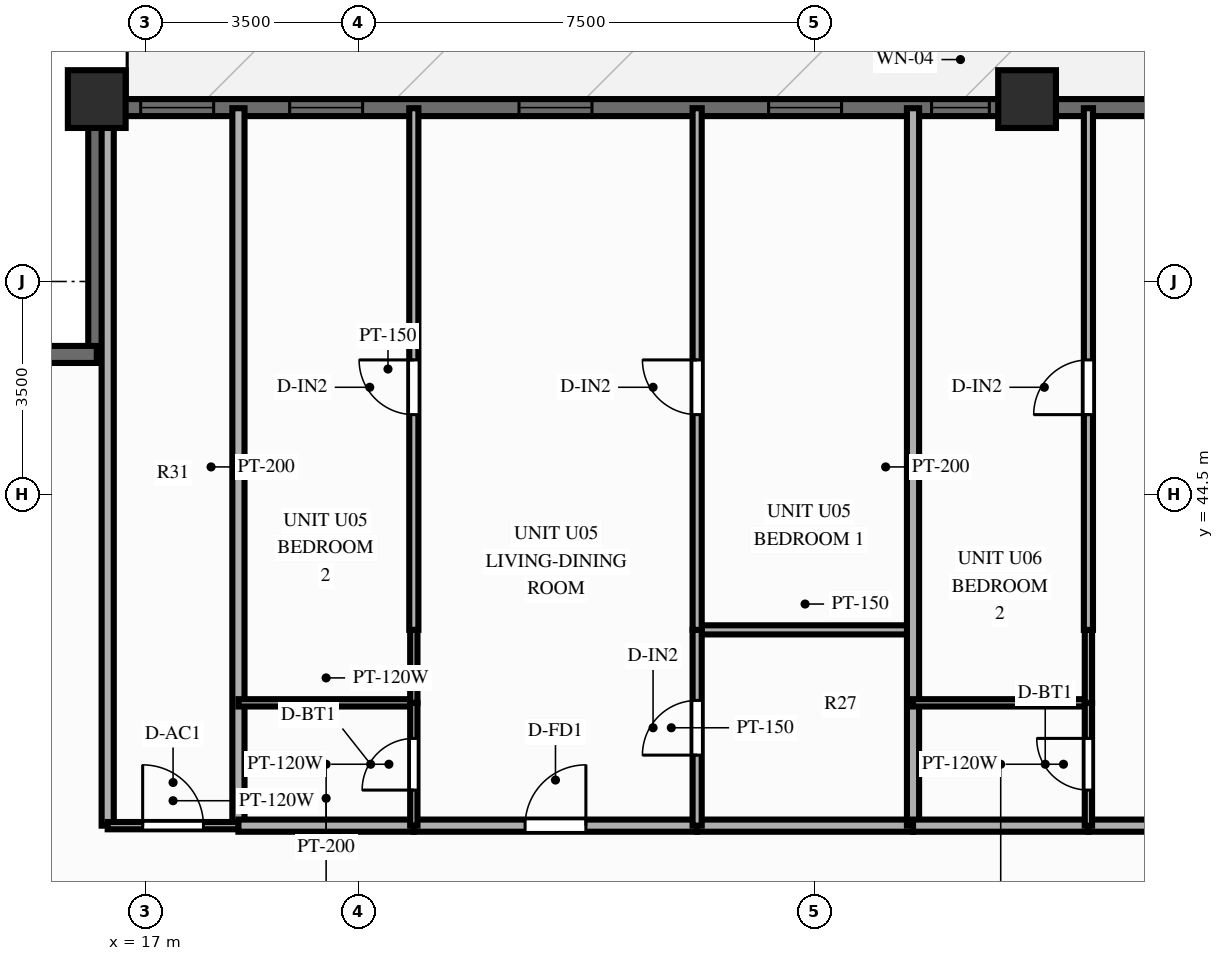
"""IFC4 building model, lengths in metres.
Left out: names, types, materials, properties, quantities, classifications, styles, units other than length and angle.
Written with IfcOpenShell. Run it as: python <this file> out.ifc"""

import sys

from ifc_helpers import new_model, si_unit, direction, frame, frame_2d, origin, origin_2d, place, context, subcontext, project, spatial, rectangle, extrude, source, transform, mapped, element, fill, save


model = new_model("IFC4")
c1 = context("Model", 3, precision=1e-05, world=origin(), true_north=direction((0.0, 1.0)))
c2 = subcontext(c1, "Body", "Model", "MODEL_VIEW")
j1 = project(units=[si_unit("LENGTHUNIT", "METRE"), si_unit("PLANEANGLEUNIT", "RADIAN")], contexts=[c1])
p1 = place(None, origin())
s1 = spatial("IfcSite", under=j1, at=p1, CompositionType="ELEMENT")
p2 = place(p1, origin())
s2 = spatial("IfcBuilding", under=s1, at=p2, CompositionType="ELEMENT")
p3 = place(p2, frame((0.0, 0.0, 86.85)))
s3 = spatial("IfcBuildingStorey", under=s2, at=p3, CompositionType="ELEMENT", Elevation=86.85)
m1 = source(origin(), c2, "Body", "SweptSolid", [
    extrude(rectangle(XDim=0.95, YDim=0.95, at=origin_2d()), origin(), (0.0, 0.0, 1.0), 3.0),
])
for number, where, z_axis, x_axis in (
    (1, (31.5, 51.0, 0.0), (0.0, 0.0, 1.0), (1.0, 0.0, 0.0)),
    (2, (16.2, 51.0, 0.0), (0.0, 0.0, 1.0), (1.0, 0.0, 0.0)),
):
    element("IfcColumn", number, at=place(p3, frame(where, z_axis=z_axis, x_axis=x_axis)), inside=s3, PredefinedType="COLUMN", context=c2, shape_type="MappedRepresentation", body=[
        mapped(m1, transform((0.0, 0.0, 0.0), scale=1.0)),
    ])
p4 = place(p3, frame((16.2, 50.86, 0.0), z_axis=(0.0, 0.0, 1.0), x_axis=(1.0, 0.0, 0.0)))
e3 = element("IfcWall", 3, at=p4, inside=s3, PredefinedType="SOLIDWALL", context=c2, shape_type="SweptSolid", body=[
    extrude(rectangle(XDim=43.6, YDim=0.28, at=frame_2d((21.8, 0.0))), origin(), (0.0, 0.0, 1.0), 2.28),
])
p5 = place(p4, frame((0.722, 0.0, 0.25)))
e4 = element("IfcOpeningElement", 4, at=p5, cuts=e3, PredefinedType="OPENING", context=c2, shape_type="SweptSolid", body=[
    extrude(rectangle(XDim=1.2, YDim=1.5, at=frame_2d((0.6, 0.75))), frame((0.0, 0.152, 0.0), z_axis=(0.0, -1.0, 0.0), x_axis=(1.0, 0.0, 0.0)), (0.0, 0.0, 1.0), 0.304),
])
p6 = place(p4, frame((3.172, 0.0, 0.25)))
e5 = element("IfcOpeningElement", 5, at=p6, cuts=e3, PredefinedType="OPENING", context=c2, shape_type="SweptSolid", body=[
    extrude(rectangle(XDim=1.2, YDim=1.5, at=frame_2d((0.6, 0.75))), frame((0.0, 0.152, 0.0), z_axis=(0.0, -1.0, 0.0), x_axis=(1.0, 0.0, 0.0)), (0.0, 0.0, 1.0), 0.304),
])
p7 = place(p4, frame((6.944, 0.0, 0.25)))
e6 = element("IfcOpeningElement", 6, at=p7, cuts=e3, PredefinedType="OPENING", context=c2, shape_type="SweptSolid", body=[
    extrude(rectangle(XDim=1.2, YDim=1.5, at=frame_2d((0.6, 0.75))), frame((0.0, 0.152, 0.0), z_axis=(0.0, -1.0, 0.0), x_axis=(1.0, 0.0, 0.0)), (0.0, 0.0, 1.0), 0.304),
])
p8 = place(p4, frame((11.049, 0.0, 0.25)))
e7 = element("IfcOpeningElement", 7, at=p8, cuts=e3, PredefinedType="OPENING", context=c2, shape_type="SweptSolid", body=[
    extrude(rectangle(XDim=1.2, YDim=1.5, at=frame_2d((0.6, 0.75))), frame((0.0, 0.152, 0.0), z_axis=(0.0, -1.0, 0.0), x_axis=(1.0, 0.0, 0.0)), (0.0, 0.0, 1.0), 0.304),
])
p9 = place(p4, frame((13.73, 0.0, 0.25)))
e8 = element("IfcOpeningElement", 8, at=p9, cuts=e3, PredefinedType="OPENING", context=c2, shape_type="SweptSolid", body=[
    extrude(rectangle(XDim=0.95, YDim=1.5, at=frame_2d((0.475, 0.75))), frame((0.0, 0.152, 0.0), z_axis=(0.0, -1.0, 0.0), x_axis=(1.0, 0.0, 0.0)), (0.0, 0.0, 1.0), 0.304),
])
p10 = place(p4, frame((18.089, 0.0, 0.0)))
e9 = element("IfcOpeningElement", 9, at=p10, cuts=e3, PredefinedType="OPENING", context=c2, shape_type="SweptSolid", body=[
    extrude(rectangle(XDim=1.1, YDim=2.15, at=frame_2d((0.55, 1.075))), frame((0.0, 0.152, 0.0), z_axis=(0.0, -1.0, 0.0), x_axis=(1.0, 0.0, 0.0)), (0.0, 0.0, 1.0), 0.304),
])
p11 = place(p4, frame((22.144, 0.0, 0.25)))
e10 = element("IfcOpeningElement", 10, at=p11, cuts=e3, PredefinedType="OPENING", context=c2, shape_type="SweptSolid", body=[
    extrude(rectangle(XDim=1.2, YDim=1.5, at=frame_2d((0.6, 0.75))), frame((0.0, 0.152, 0.0), z_axis=(0.0, -1.0, 0.0), x_axis=(1.0, 0.0, 0.0)), (0.0, 0.0, 1.0), 0.304),
])
p12 = place(p4, frame((25.242, 0.0, 0.25)))
e11 = element("IfcOpeningElement", 11, at=p12, cuts=e3, PredefinedType="OPENING", context=c2, shape_type="SweptSolid", body=[
    extrude(rectangle(XDim=1.2, YDim=1.5, at=frame_2d((0.6, 0.75))), frame((0.0, 0.152, 0.0), z_axis=(0.0, -1.0, 0.0), x_axis=(1.0, 0.0, 0.0)), (0.0, 0.0, 1.0), 0.304),
])
p13 = place(p4, frame((29.021, 0.0, 0.25)))
e12 = element("IfcOpeningElement", 12, at=p13, cuts=e3, PredefinedType="OPENING", context=c2, shape_type="SweptSolid", body=[
    extrude(rectangle(XDim=0.95, YDim=1.5, at=frame_2d((0.475, 0.75))), frame((0.0, 0.152, 0.0), z_axis=(0.0, -1.0, 0.0), x_axis=(1.0, 0.0, 0.0)), (0.0, 0.0, 1.0), 0.304),
])
p14 = place(p4, frame((31.574, 0.0, 0.25)))
e13 = element("IfcOpeningElement", 13, at=p14, cuts=e3, PredefinedType="OPENING", context=c2, shape_type="SweptSolid", body=[
    extrude(rectangle(XDim=1.2, YDim=1.5, at=frame_2d((0.6, 0.75))), frame((0.0, 0.152, 0.0), z_axis=(0.0, -1.0, 0.0), x_axis=(1.0, 0.0, 0.0)), (0.0, 0.0, 1.0), 0.304),
])
p15 = place(p4, frame((34.692, 0.0, 0.25)))
e14 = element("IfcOpeningElement", 14, at=p15, cuts=e3, PredefinedType="OPENING", context=c2, shape_type="SweptSolid", body=[
    extrude(rectangle(XDim=1.2, YDim=1.5, at=frame_2d((0.6, 0.75))), frame((0.0, 0.152, 0.0), z_axis=(0.0, -1.0, 0.0), x_axis=(1.0, 0.0, 0.0)), (0.0, 0.0, 1.0), 0.304),
])
p16 = place(p4, frame((37.622, 0.0, 0.25)))
e15 = element("IfcOpeningElement", 15, at=p16, cuts=e3, PredefinedType="OPENING", context=c2, shape_type="SweptSolid", body=[
    extrude(rectangle(XDim=1.2, YDim=1.5, at=frame_2d((0.6, 0.75))), frame((0.0, 0.152, 0.0), z_axis=(0.0, -1.0, 0.0), x_axis=(1.0, 0.0, 0.0)), (0.0, 0.0, 1.0), 0.304),
])
p17 = place(p4, frame((40.957, 0.0, 0.25)))
e16 = element("IfcOpeningElement", 16, at=p17, cuts=e3, PredefinedType="OPENING", context=c2, shape_type="SweptSolid", body=[
    extrude(rectangle(XDim=1.2, YDim=1.5, at=frame_2d((0.6, 0.75))), frame((0.0, 0.152, 0.0), z_axis=(0.0, -1.0, 0.0), x_axis=(1.0, 0.0, 0.0)), (0.0, 0.0, 1.0), 0.304),
])
for number, where, z_axis, x_axis in (
    (17, (16.2, 46.8, 0.0), (0.0, 0.0, 1.0), (0.0, 1.0, 0.0)),
    (18, (12.08, 46.8, 0.0), (0.0, 0.0, 1.0), (1.0, 0.0, 0.0)),
):
    element("IfcWall", number, at=place(p3, frame(where, z_axis=z_axis, x_axis=x_axis)), inside=s3, PredefinedType="SOLIDWALL", context=c2, shape_type="SweptSolid", body=[
        extrude(rectangle(XDim=4.12, YDim=0.28, at=frame_2d((2.06, 0.0))), origin(), (0.0, 0.0, 1.0), 2.28),
    ])
for number, where, z_axis, x_axis in (
    (19, (16.38, 39.05, 0.0), (0.0, 0.0, 1.0), (0.0, 1.0, 0.0)),
    (20, (18.53, 39.05, 0.0), (0.0, 0.0, 1.0), (0.0, 1.0, 0.0)),
):
    element("IfcWall", number, at=place(p3, frame(where, z_axis=z_axis, x_axis=x_axis)), inside=s3, PredefinedType="PARTITIONING", context=c2, shape_type="SweptSolid", body=[
        extrude(rectangle(XDim=11.8, YDim=0.2, at=frame_2d((5.9, 0.0))), origin(), (0.0, 0.0, 1.0), 2.79),
    ])
p18 = place(p3, frame((16.38, 39.05, 0.0), z_axis=(0.0, 0.0, 1.0), x_axis=(1.0, 0.0, 0.0)))
e21 = element("IfcWall", 21, at=p18, inside=s3, PredefinedType="PARTITIONING", context=c2, shape_type="SweptSolid", body=[
    extrude(rectangle(XDim=2.15, YDim=0.12, at=frame_2d((1.075, 0.0))), origin(), (0.0, 0.0, 1.0), 2.79),
])
p19 = place(p18, frame((0.575, 0.0, 0.0)))
e22 = element("IfcOpeningElement", 22, at=p19, cuts=e21, PredefinedType="OPENING", context=c2, shape_type="SweptSolid", body=[
    extrude(rectangle(XDim=1.0, YDim=2.1, at=frame_2d((0.5, 1.05))), frame((0.0, 0.072, 0.0), z_axis=(0.0, -1.0, 0.0), x_axis=(1.0, 0.0, 0.0)), (0.0, 0.0, 1.0), 0.144),
])
p20 = place(p3, frame((18.53, 39.05, 0.0), z_axis=(0.0, 0.0, 1.0), x_axis=(1.0, 0.0, 0.0)))
e23 = element("IfcWall", 23, at=p20, inside=s3, PredefinedType="PARTITIONING", context=c2, shape_type="SweptSolid", body=[
    extrude(rectangle(XDim=2.885, YDim=0.2, at=frame_2d((1.442, 0.0))), origin(), (0.0, 0.0, 1.0), 2.79),
])
p21 = place(p3, frame((21.415, 39.05, 0.0), z_axis=(0.0, 0.0, 1.0), x_axis=(1.0, 0.0, 0.0)))
e24 = element("IfcWall", 24, at=p21, inside=s3, PredefinedType="PARTITIONING", context=c2, shape_type="SweptSolid", body=[
    extrude(rectangle(XDim=4.66, YDim=0.2, at=frame_2d((2.33, 0.0))), origin(), (0.0, 0.0, 1.0), 2.79),
])
p22 = place(p21, frame((1.83, 0.0, 0.0)))
e25 = element("IfcOpeningElement", 25, at=p22, cuts=e24, PredefinedType="OPENING", context=c2, shape_type="SweptSolid", body=[
    extrude(rectangle(XDim=1.0, YDim=2.15, at=frame_2d((0.5, 1.075))), frame((0.0, 0.112, 0.0), z_axis=(0.0, -1.0, 0.0), x_axis=(1.0, 0.0, 0.0)), (0.0, 0.0, 1.0), 0.224),
])
p23 = place(p3, frame((26.074, 39.05, 0.0), z_axis=(0.0, 0.0, 1.0), x_axis=(1.0, 0.0, 0.0)))
e26 = element("IfcWall", 26, at=p23, inside=s3, PredefinedType="PARTITIONING", context=c2, shape_type="SweptSolid", body=[
    extrude(rectangle(XDim=3.55, YDim=0.2, at=frame_2d((1.775, 0.0))), origin(), (0.0, 0.0, 1.0), 2.79),
])
p24 = place(p3, frame((18.53, 41.07, 0.0), z_axis=(0.0, 0.0, 1.0), x_axis=(1.0, 0.0, 0.0)))
e27 = element("IfcWall", 27, at=p24, inside=s3, PredefinedType="PARTITIONING", context=c2, shape_type="SweptSolid", body=[
    extrude(rectangle(XDim=2.885, YDim=0.12, at=frame_2d((1.442, 0.0))), origin(), (0.0, 0.0, 1.0), 2.79),
])
p25 = place(p3, frame((26.074, 42.27, 0.0), z_axis=(0.0, 0.0, 1.0), x_axis=(1.0, 0.0, 0.0)))
e28 = element("IfcWall", 28, at=p25, inside=s3, PredefinedType="PARTITIONING", context=c2, shape_type="SweptSolid", body=[
    extrude(rectangle(XDim=3.55, YDim=0.15, at=frame_2d((1.775, 0.0))), origin(), (0.0, 0.0, 1.0), 2.79),
])
p26 = place(p3, frame((21.415, 39.05, 0.0), z_axis=(0.0, 0.0, 1.0), x_axis=(0.0, 1.0, 0.0)))
e29 = element("IfcWall", 29, at=p26, inside=s3, PredefinedType="PARTITIONING", context=c2, shape_type="SweptSolid", body=[
    extrude(rectangle(XDim=2.02, YDim=0.12, at=frame_2d((1.01, 0.0))), origin(), (0.0, 0.0, 1.0), 2.79),
])
p27 = place(p26, frame((0.585, 0.0, 0.0)))
e30 = element("IfcOpeningElement", 30, at=p27, cuts=e29, PredefinedType="OPENING", context=c2, shape_type="SweptSolid", body=[
    extrude(rectangle(XDim=0.85, YDim=2.05, at=frame_2d((0.425, 1.025))), frame((0.0, 0.072, 0.0), z_axis=(0.0, -1.0, 0.0), x_axis=(1.0, 0.0, 0.0)), (0.0, 0.0, 1.0), 0.144),
])
p28 = place(p3, frame((21.415, 41.07, 0.0), z_axis=(0.0, 0.0, 1.0), x_axis=(0.0, 1.0, 0.0)))
e31 = element("IfcWall", 31, at=p28, inside=s3, PredefinedType="PARTITIONING", context=c2, shape_type="SweptSolid", body=[
    extrude(rectangle(XDim=1.2, YDim=0.12, at=frame_2d((0.6, 0.0))), origin(), (0.0, 0.0, 1.0), 2.79),
])
p29 = place(p3, frame((21.415, 42.27, 0.0), z_axis=(0.0, 0.0, 1.0), x_axis=(0.0, 1.0, 0.0)))
e32 = element("IfcWall", 32, at=p29, inside=s3, PredefinedType="PARTITIONING", context=c2, shape_type="SweptSolid", body=[
    extrude(rectangle(XDim=8.58, YDim=0.15, at=frame_2d((4.29, 0.0))), origin(), (0.0, 0.0, 1.0), 2.79),
])
p30 = place(p29, frame((3.54, 0.0, 0.0)))
e33 = element("IfcOpeningElement", 33, at=p30, cuts=e32, PredefinedType="OPENING", context=c2, shape_type="SweptSolid", body=[
    extrude(rectangle(XDim=0.9, YDim=2.1, at=frame_2d((0.45, 1.05))), frame((0.0, 0.087, 0.0), z_axis=(0.0, -1.0, 0.0), x_axis=(1.0, 0.0, 0.0)), (0.0, 0.0, 1.0), 0.174),
])
p31 = place(p3, frame((26.074, 39.05, 0.0), z_axis=(0.0, 0.0, 1.0), x_axis=(0.0, 1.0, 0.0)))
e34 = element("IfcWall", 34, at=p31, inside=s3, PredefinedType="PARTITIONING", context=c2, shape_type="SweptSolid", body=[
    extrude(rectangle(XDim=3.22, YDim=0.15, at=frame_2d((1.61, 0.0))), origin(), (0.0, 0.0, 1.0), 2.79),
])
p32 = place(p31, frame((1.16, 0.0, 0.0)))
e35 = element("IfcOpeningElement", 35, at=p32, cuts=e34, PredefinedType="OPENING", context=c2, shape_type="SweptSolid", body=[
    extrude(rectangle(XDim=0.9, YDim=2.1, at=frame_2d((0.45, 1.05))), frame((0.0, 0.087, 0.0), z_axis=(0.0, -1.0, 0.0), x_axis=(1.0, 0.0, 0.0)), (0.0, 0.0, 1.0), 0.174),
])
p33 = place(p3, frame((26.074, 42.27, 0.0), z_axis=(0.0, 0.0, 1.0), x_axis=(0.0, 1.0, 0.0)))
e36 = element("IfcWall", 36, at=p33, inside=s3, PredefinedType="PARTITIONING", context=c2, shape_type="SweptSolid", body=[
    extrude(rectangle(XDim=8.58, YDim=0.15, at=frame_2d((4.29, 0.0))), origin(), (0.0, 0.0, 1.0), 2.79),
])
p34 = place(p33, frame((3.54, 0.0, 0.0)))
e37 = element("IfcOpeningElement", 37, at=p34, cuts=e36, PredefinedType="OPENING", context=c2, shape_type="SweptSolid", body=[
    extrude(rectangle(XDim=0.9, YDim=2.1, at=frame_2d((0.45, 1.05))), frame((0.0, 0.087, 0.0), z_axis=(0.0, -1.0, 0.0), x_axis=(1.0, 0.0, 0.0)), (0.0, 0.0, 1.0), 0.174),
])
p35 = place(p3, frame((29.624, 39.05, 0.0), z_axis=(0.0, 0.0, 1.0), x_axis=(0.0, 1.0, 0.0)))
e38 = element("IfcWall", 38, at=p35, inside=s3, PredefinedType="PARTITIONING", context=c2, shape_type="SweptSolid", body=[
    extrude(rectangle(XDim=11.8, YDim=0.2, at=frame_2d((5.9, 0.0))), origin(), (0.0, 0.0, 1.0), 2.79),
])
p36 = place(p3, frame((29.624, 39.05, 0.0), z_axis=(0.0, 0.0, 1.0), x_axis=(1.0, 0.0, 0.0)))
e39 = element("IfcWall", 39, at=p36, inside=s3, PredefinedType="PARTITIONING", context=c2, shape_type="SweptSolid", body=[
    extrude(rectangle(XDim=2.885, YDim=0.2, at=frame_2d((1.442, 0.0))), origin(), (0.0, 0.0, 1.0), 2.79),
])
p37 = place(p3, frame((32.509, 39.05, 0.0), z_axis=(0.0, 0.0, 1.0), x_axis=(1.0, 0.0, 0.0)))
e40 = element("IfcWall", 40, at=p37, inside=s3, PredefinedType="PARTITIONING", context=c2, shape_type="SweptSolid", body=[
    extrude(rectangle(XDim=4.66, YDim=0.2, at=frame_2d((2.33, 0.0))), origin(), (0.0, 0.0, 1.0), 2.79),
])
p38 = place(p37, frame((1.83, 0.0, 0.0)))
e41 = element("IfcOpeningElement", 41, at=p38, cuts=e40, PredefinedType="OPENING", context=c2, shape_type="SweptSolid", body=[
    extrude(rectangle(XDim=1.0, YDim=2.15, at=frame_2d((0.5, 1.075))), frame((0.0, 0.112, 0.0), z_axis=(0.0, -1.0, 0.0), x_axis=(1.0, 0.0, 0.0)), (0.0, 0.0, 1.0), 0.224),
])
p39 = place(p3, frame((29.624, 41.07, 0.0), z_axis=(0.0, 0.0, 1.0), x_axis=(1.0, 0.0, 0.0)))
e42 = element("IfcWall", 42, at=p39, inside=s3, PredefinedType="PARTITIONING", context=c2, shape_type="SweptSolid", body=[
    extrude(rectangle(XDim=2.885, YDim=0.12, at=frame_2d((1.442, 0.0))), origin(), (0.0, 0.0, 1.0), 2.79),
])
p40 = place(p3, frame((32.509, 39.05, 0.0), z_axis=(0.0, 0.0, 1.0), x_axis=(0.0, 1.0, 0.0)))
e43 = element("IfcWall", 43, at=p40, inside=s3, PredefinedType="PARTITIONING", context=c2, shape_type="SweptSolid", body=[
    extrude(rectangle(XDim=2.02, YDim=0.12, at=frame_2d((1.01, 0.0))), origin(), (0.0, 0.0, 1.0), 2.79),
])
p41 = place(p40, frame((0.585, 0.0, 0.0)))
e44 = element("IfcOpeningElement", 44, at=p41, cuts=e43, PredefinedType="OPENING", context=c2, shape_type="SweptSolid", body=[
    extrude(rectangle(XDim=0.85, YDim=2.05, at=frame_2d((0.425, 1.025))), frame((0.0, 0.072, 0.0), z_axis=(0.0, -1.0, 0.0), x_axis=(1.0, 0.0, 0.0)), (0.0, 0.0, 1.0), 0.144),
])
p42 = place(p3, frame((32.509, 41.07, 0.0), z_axis=(0.0, 0.0, 1.0), x_axis=(0.0, 1.0, 0.0)))
e45 = element("IfcWall", 45, at=p42, inside=s3, PredefinedType="PARTITIONING", context=c2, shape_type="SweptSolid", body=[
    extrude(rectangle(XDim=1.2, YDim=0.12, at=frame_2d((0.6, 0.0))), origin(), (0.0, 0.0, 1.0), 2.79),
])
p43 = place(p3, frame((32.509, 42.27, 0.0), z_axis=(0.0, 0.0, 1.0), x_axis=(0.0, 1.0, 0.0)))
e46 = element("IfcWall", 46, at=p43, inside=s3, PredefinedType="PARTITIONING", context=c2, shape_type="SweptSolid", body=[
    extrude(rectangle(XDim=8.58, YDim=0.15, at=frame_2d((4.29, 0.0))), origin(), (0.0, 0.0, 1.0), 2.79),
])
p44 = place(p43, frame((3.54, 0.0, 0.0)))
e47 = element("IfcOpeningElement", 47, at=p44, cuts=e46, PredefinedType="OPENING", context=c2, shape_type="SweptSolid", body=[
    extrude(rectangle(XDim=0.9, YDim=2.1, at=frame_2d((0.45, 1.05))), frame((0.0, 0.087, 0.0), z_axis=(0.0, -1.0, 0.0), x_axis=(1.0, 0.0, 0.0)), (0.0, 0.0, 1.0), 0.174),
])
m2 = source(origin(), c2, "Body", "SweptSolid", [
    extrude(rectangle(XDim=1.2, YDim=1.5, at=frame_2d((0.6, 0.75))), frame((0.0, 0.03, 0.0), z_axis=(0.0, -1.0, 0.0), x_axis=(1.0, 0.0, 0.0)), (0.0, 0.0, 1.0), 0.06),
])
p45 = place(p5, origin())
e48 = element("IfcWindow", 48, at=p45, inside=s3, PartitioningType="SINGLE_PANEL", PredefinedType="WINDOW", context=c2, shape_type="MappedRepresentation", body=[
    mapped(m2, transform((0.0, 0.0, 0.0), scale=1.0)),
])
fill(e4, e48)
p46 = place(p6, origin())
e49 = element("IfcWindow", 49, at=p46, inside=s3, PartitioningType="SINGLE_PANEL", PredefinedType="WINDOW", context=c2, shape_type="MappedRepresentation", body=[
    mapped(m2, transform((0.0, 0.0, 0.0), scale=1.0)),
])
fill(e5, e49)
p47 = place(p7, origin())
e50 = element("IfcWindow", 50, at=p47, inside=s3, PartitioningType="SINGLE_PANEL", PredefinedType="WINDOW", context=c2, shape_type="MappedRepresentation", body=[
    mapped(m2, transform((0.0, 0.0, 0.0), scale=1.0)),
])
fill(e6, e50)
p48 = place(p8, origin())
e51 = element("IfcWindow", 51, at=p48, inside=s3, PartitioningType="SINGLE_PANEL", PredefinedType="WINDOW", context=c2, shape_type="MappedRepresentation", body=[
    mapped(m2, transform((0.0, 0.0, 0.0), scale=1.0)),
])
fill(e7, e51)
m3 = source(origin(), c2, "Body", "SweptSolid", [
    extrude(rectangle(XDim=0.95, YDim=1.5, at=frame_2d((0.475, 0.75))), frame((0.0, 0.03, 0.0), z_axis=(0.0, -1.0, 0.0), x_axis=(1.0, 0.0, 0.0)), (0.0, 0.0, 1.0), 0.06),
])
p49 = place(p9, origin())
e52 = element("IfcWindow", 52, at=p49, inside=s3, PartitioningType="SINGLE_PANEL", PredefinedType="WINDOW", context=c2, shape_type="MappedRepresentation", body=[
    mapped(m3, transform((0.0, 0.0, 0.0), scale=1.0)),
])
fill(e8, e52)
m4 = source(origin(), c2, "Body", "SweptSolid", [
    extrude(rectangle(XDim=1.0, YDim=2.1, at=frame_2d((0.5, 1.05))), frame((0.0, 0.025, 0.0), z_axis=(0.0, -1.0, 0.0), x_axis=(1.0, 0.0, 0.0)), (0.0, 0.0, 1.0), 0.05),
])
p50 = place(p19, origin())
e53 = element("IfcDoor", 53, at=p50, inside=s3, OperationType="SINGLE_SWING_LEFT", PredefinedType="DOOR", context=c2, shape_type="MappedRepresentation", body=[
    mapped(m4, transform((0.0, 0.0, 0.0), scale=1.0)),
])
fill(e22, e53)
m5 = source(origin(), c2, "Body", "SweptSolid", [
    extrude(rectangle(XDim=1.0, YDim=2.15, at=frame_2d((0.5, 1.075))), frame((0.0, 0.025, 0.0), z_axis=(0.0, -1.0, 0.0), x_axis=(1.0, 0.0, 0.0)), (0.0, 0.0, 1.0), 0.05),
])
p51 = place(p22, origin())
e54 = element("IfcDoor", 54, at=p51, inside=s3, OperationType="SINGLE_SWING_RIGHT", PredefinedType="DOOR", context=c2, shape_type="MappedRepresentation", body=[
    mapped(m5, transform((0.0, 0.0, 0.0), scale=1.0)),
])
fill(e25, e54)
m6 = source(origin(), c2, "Body", "SweptSolid", [
    extrude(rectangle(XDim=0.85, YDim=2.05, at=frame_2d((0.425, 1.025))), frame((0.0, 0.025, 0.0), z_axis=(0.0, -1.0, 0.0), x_axis=(1.0, 0.0, 0.0)), (0.0, 0.0, 1.0), 0.05),
])
p52 = place(p27, origin())
e55 = element("IfcDoor", 55, at=p52, inside=s3, OperationType="SINGLE_SWING_LEFT", PredefinedType="DOOR", context=c2, shape_type="MappedRepresentation", body=[
    mapped(m6, transform((0.0, 0.0, 0.0), scale=1.0)),
])
fill(e30, e55)
m7 = source(origin(), c2, "Body", "SweptSolid", [
    extrude(rectangle(XDim=0.9, YDim=2.1, at=frame_2d((0.45, 1.05))), frame((0.0, 0.025, 0.0), z_axis=(0.0, -1.0, 0.0), x_axis=(1.0, 0.0, 0.0)), (0.0, 0.0, 1.0), 0.05),
])
p53 = place(p30, origin())
e56 = element("IfcDoor", 56, at=p53, inside=s3, OperationType="SINGLE_SWING_RIGHT", PredefinedType="DOOR", context=c2, shape_type="MappedRepresentation", body=[
    mapped(m7, transform((0.0, 0.0, 0.0), scale=1.0)),
])
fill(e33, e56)
p54 = place(p32, origin())
e57 = element("IfcDoor", 57, at=p54, inside=s3, OperationType="SINGLE_SWING_LEFT", PredefinedType="DOOR", context=c2, shape_type="MappedRepresentation", body=[
    mapped(m7, transform((0.0, 0.0, 0.0), scale=1.0)),
])
fill(e35, e57)
p55 = place(p34, origin())
e58 = element("IfcDoor", 58, at=p55, inside=s3, OperationType="SINGLE_SWING_RIGHT", PredefinedType="DOOR", context=c2, shape_type="MappedRepresentation", body=[
    mapped(m7, transform((0.0, 0.0, 0.0), scale=1.0)),
])
fill(e37, e58)
p56 = place(p41, origin())
e59 = element("IfcDoor", 59, at=p56, inside=s3, OperationType="SINGLE_SWING_RIGHT", PredefinedType="DOOR", context=c2, shape_type="MappedRepresentation", body=[
    mapped(m6, transform((0.0, 0.0, 0.0), scale=1.0)),
])
fill(e44, e59)
p57 = place(p44, origin())
e60 = element("IfcDoor", 60, at=p57, inside=s3, OperationType="SINGLE_SWING_LEFT", PredefinedType="DOOR", context=c2, shape_type="MappedRepresentation", body=[
    mapped(m7, transform((0.0, 0.0, 0.0), scale=1.0)),
])
fill(e47, e60)
save(model, sys.argv[1])
